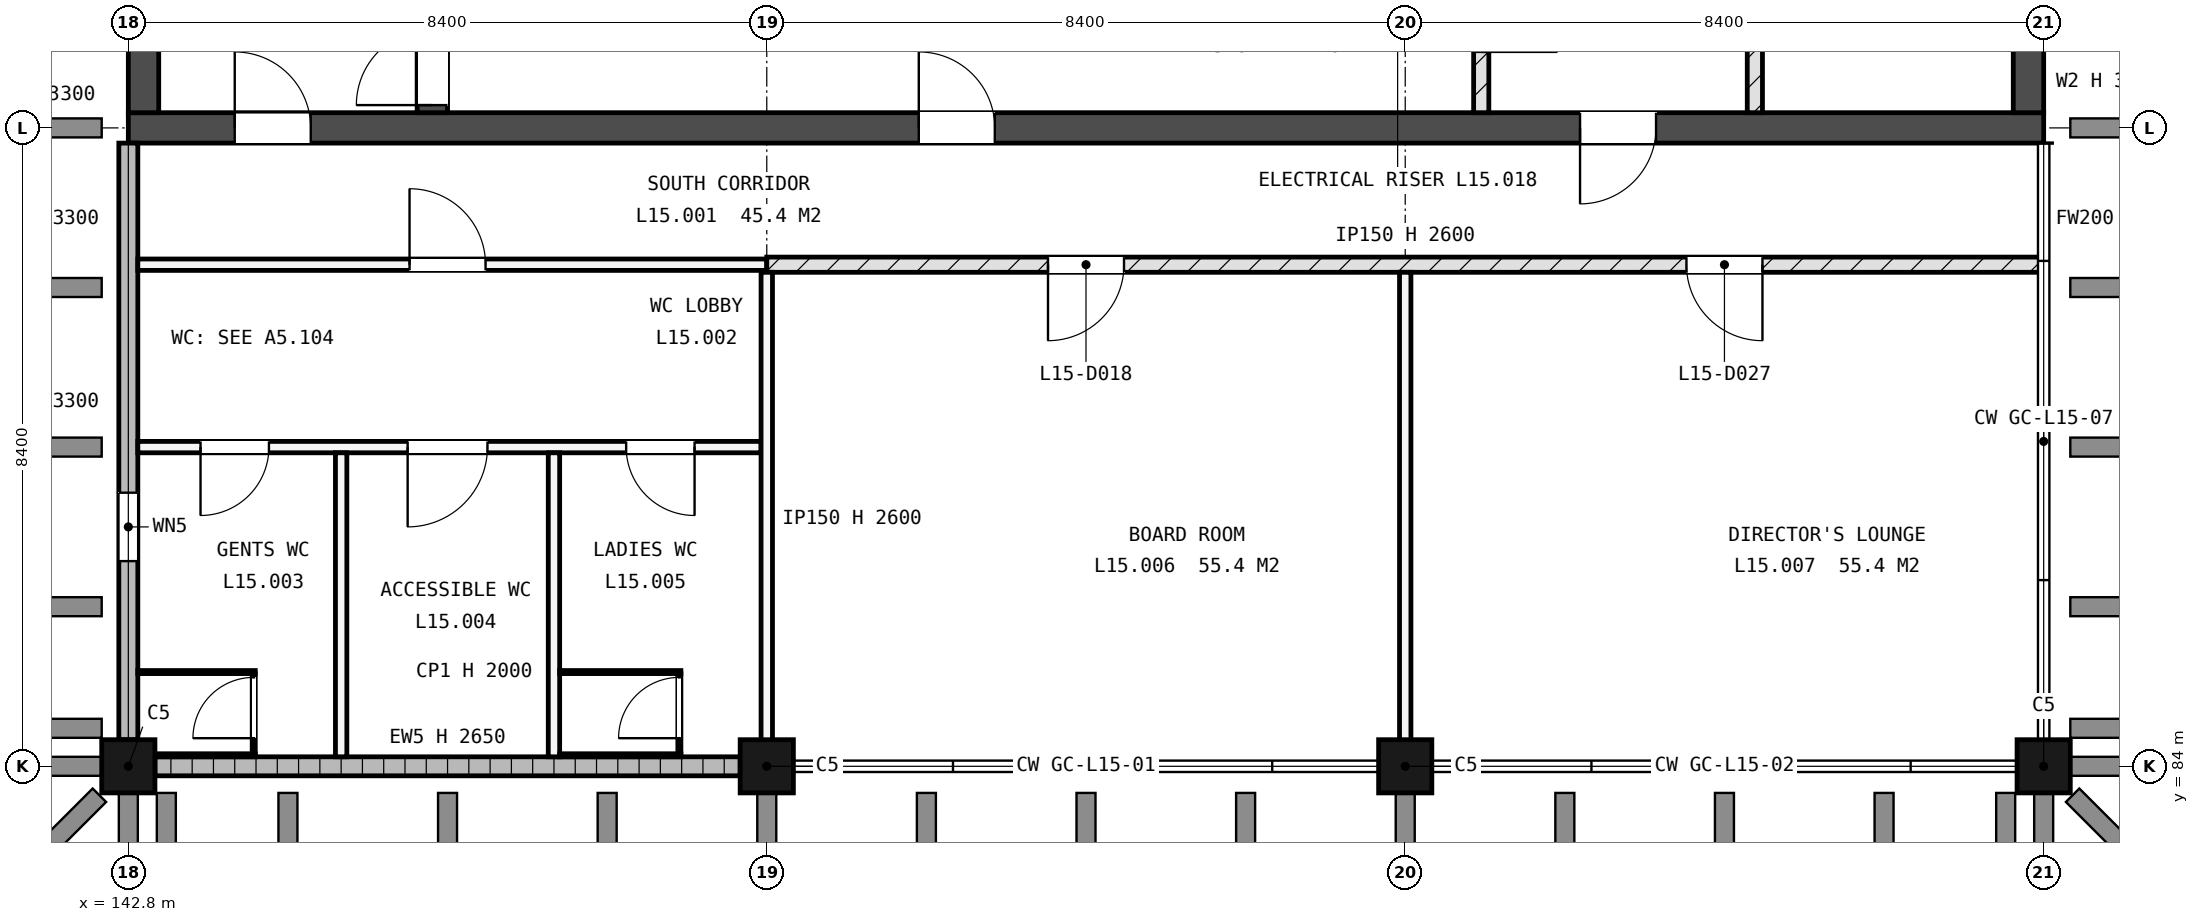
"""IFC4 building model, lengths in metres.
Left out: names, types, materials, properties, quantities, classifications, styles, units other than length and angle.
Written with IfcOpenShell. Run it as: python <this file> out.ifc"""

import sys

from ifc_helpers import new_model, si_unit, direction, frame, frame_2d, origin, origin_2d, place, context, subcontext, project, spatial, rectangle, extrude, element, fill, save


model = new_model("IFC4")
c1 = context("Model", 3, precision=1e-05, world=origin(), true_north=direction((0.0, 1.0)))
c2 = subcontext(c1, "Body", "Model", "MODEL_VIEW")
j1 = project(units=[si_unit("LENGTHUNIT", "METRE"), si_unit("PLANEANGLEUNIT", "RADIAN")], contexts=[c1])
p1 = place(None, origin())
s1 = spatial("IfcSite", under=j1, at=p1, CompositionType="ELEMENT")
p2 = place(p1, origin())
s2 = spatial("IfcBuilding", under=s1, at=p2, CompositionType="ELEMENT")
p3 = place(p2, frame((0.0, 0.0, 57.6)))
s3 = spatial("IfcBuildingStorey", under=s2, at=p3, CompositionType="ELEMENT", Elevation=57.6)
for number, where, z_axis, x_axis in (
    (1, (142.8, 84.0, -0.3), (0.0, 0.0, 1.0), (1.0, 0.0, 0.0)),
    (2, (151.2, 84.0, -0.3), (0.0, 0.0, 1.0), (1.0, 0.0, 0.0)),
    (3, (159.6, 84.0, -0.3), (0.0, 0.0, 1.0), (1.0, 0.0, 0.0)),
    (4, (168.0, 84.0, -0.3), (0.0, 0.0, 1.0), (1.0, 0.0, 0.0)),
):
    element("IfcColumn", number, at=place(p3, frame(where, z_axis=z_axis, x_axis=x_axis)), inside=s3, PredefinedType="COLUMN", context=c2, shape_type="SweptSolid", body=[
        extrude(rectangle(XDim=0.7, YDim=0.7, at=origin_2d()), origin(), (0.0, 0.0, 1.0), 3.6),
    ])
p4 = place(p3, frame((142.8, 92.4, -0.3), z_axis=(0.0, 0.0, 1.0), x_axis=(1.0, 0.0, 0.0)))
e5 = element("IfcWall", 5, at=p4, inside=s3, PredefinedType="SHEAR", context=c2, shape_type="SweptSolid", body=[
    extrude(rectangle(XDim=25.2, YDim=0.4, at=frame_2d((12.6, 0.0))), origin(), (0.0, 0.0, 1.0), 3.6),
])
p5 = place(p4, frame((1.4, 0.0, 0.3)))
e6 = element("IfcOpeningElement", 6, at=p5, cuts=e5, PredefinedType="OPENING", context=c2, shape_type="SweptSolid", body=[
    extrude(rectangle(XDim=1.0, YDim=2.1, at=frame_2d((0.5, 1.05))), frame((0.0, 0.21, 0.0), z_axis=(0.0, -1.0, 0.0), x_axis=(1.0, 0.0, 0.0)), (0.0, 0.0, 1.0), 0.42),
])
p6 = place(p4, frame((19.1, 0.0, 0.3)))
e7 = element("IfcOpeningElement", 7, at=p6, cuts=e5, PredefinedType="OPENING", context=c2, shape_type="SweptSolid", body=[
    extrude(rectangle(XDim=1.0, YDim=2.1, at=frame_2d((0.5, 1.05))), frame((0.0, 0.21, 0.0), z_axis=(0.0, -1.0, 0.0), x_axis=(1.0, 0.0, 0.0)), (0.0, 0.0, 1.0), 0.42),
])
p7 = place(p4, frame((10.4, 0.0, 0.3)))
e8 = element("IfcOpeningElement", 8, at=p7, cuts=e5, PredefinedType="OPENING", context=c2, shape_type="SweptSolid", body=[
    extrude(rectangle(XDim=1.0, YDim=2.1, at=frame_2d((0.5, 1.05))), frame((0.0, 0.21, 0.0), z_axis=(0.0, -1.0, 0.0), x_axis=(1.0, 0.0, 0.0)), (0.0, 0.0, 1.0), 0.42),
])
p8 = place(p3, frame((143.0, 92.6, -0.3), z_axis=(0.0, 0.0, 1.0), x_axis=(0.0, 1.0, 0.0)))
e9 = element("IfcWall", 9, at=p8, inside=s3, PredefinedType="SHEAR", context=c2, shape_type="SweptSolid", body=[
    extrude(rectangle(XDim=16.4, YDim=0.4, at=frame_2d((8.2, 0.0))), origin(), (0.0, 0.0, 1.0), 3.6),
])
p9 = place(p8, frame((3.0, 0.0, 1.9)))
e10 = element("IfcOpeningElement", 10, at=p9, cuts=e9, PredefinedType="OPENING", context=c2, shape_type="SweptSolid", body=[
    extrude(rectangle(XDim=1.2, YDim=0.9, at=frame_2d((0.6, 0.45))), frame((0.0, 0.21, 0.0), z_axis=(0.0, -1.0, 0.0), x_axis=(1.0, 0.0, 0.0)), (0.0, 0.0, 1.0), 0.42),
])
p10 = place(p3, frame((167.8, 92.6, -0.3), z_axis=(0.0, 0.0, 1.0), x_axis=(0.0, 1.0, 0.0)))
e11 = element("IfcWall", 11, at=p10, inside=s3, PredefinedType="SHEAR", context=c2, shape_type="SweptSolid", body=[
    extrude(rectangle(XDim=16.4, YDim=0.4, at=frame_2d((8.2, 0.0))), origin(), (0.0, 0.0, 1.0), 3.6),
])
p11 = place(p10, frame((12.2, 0.0, 1.9)))
e12 = element("IfcOpeningElement", 12, at=p11, cuts=e11, PredefinedType="OPENING", context=c2, shape_type="SweptSolid", body=[
    extrude(rectangle(XDim=1.2, YDim=0.9, at=frame_2d((0.6, 0.45))), frame((0.0, 0.21, 0.0), z_axis=(0.0, -1.0, 0.0), x_axis=(1.0, 0.0, 0.0)), (0.0, 0.0, 1.0), 0.42),
])
p12 = place(p3, frame((146.8, 92.6, -0.3), z_axis=(0.0, 0.0, 1.0), x_axis=(0.0, 1.0, 0.0)))
e13 = element("IfcWall", 13, at=p12, inside=s3, PredefinedType="SHEAR", context=c2, shape_type="SweptSolid", body=[
    extrude(rectangle(XDim=7.525, YDim=0.4, at=frame_2d((3.762, 0.0))), origin(), (0.0, 0.0, 1.0), 3.6),
])
p13 = place(p12, frame((0.1, 0.0, 0.3)))
e14 = element("IfcOpeningElement", 14, at=p13, cuts=e13, PredefinedType="OPENING", context=c2, shape_type="SweptSolid", body=[
    extrude(rectangle(XDim=1.0, YDim=2.1, at=frame_2d((0.5, 1.05))), frame((0.0, 0.21, 0.0), z_axis=(0.0, -1.0, 0.0), x_axis=(1.0, 0.0, 0.0)), (0.0, 0.0, 1.0), 0.42),
])
p14 = place(p3, frame((143.15, 84.0, 0.0), z_axis=(0.0, 0.0, 1.0), x_axis=(1.0, 0.0, 0.0)))
e15 = element("IfcWall", 15, at=p14, inside=s3, PredefinedType="STANDARD", context=c2, shape_type="SweptSolid", body=[
    extrude(rectangle(XDim=7.7, YDim=0.25, at=frame_2d((3.85, 0.0))), origin(), (0.0, 0.0, 1.0), 2.65),
])
p15 = place(p3, frame((142.8, 84.35, 0.0), z_axis=(0.0, 0.0, 1.0), x_axis=(0.0, 1.0, 0.0)))
e16 = element("IfcWall", 16, at=p15, inside=s3, PredefinedType="STANDARD", context=c2, shape_type="SweptSolid", body=[
    extrude(rectangle(XDim=7.85, YDim=0.25, at=frame_2d((3.925, 0.0))), origin(), (0.0, 0.0, 1.0), 3.3),
])
p16 = place(p15, frame((2.35, 0.0, 2.1)))
e17 = element("IfcOpeningElement", 17, at=p16, cuts=e16, PredefinedType="OPENING", context=c2, shape_type="SweptSolid", body=[
    extrude(rectangle(XDim=0.9, YDim=0.6, at=frame_2d((0.45, 0.3))), frame((0.0, 0.135, 0.0), z_axis=(0.0, -1.0, 0.0), x_axis=(1.0, 0.0, 0.0)), (0.0, 0.0, 1.0), 0.27),
])
p17 = place(p3, frame((142.925, 88.2, 0.0), z_axis=(0.0, 0.0, 1.0), x_axis=(1.0, 0.0, 0.0)))
e18 = element("IfcWall", 18, at=p17, inside=s3, PredefinedType="PARTITIONING", context=c2, shape_type="SweptSolid", body=[
    extrude(rectangle(XDim=8.2, YDim=0.15, at=frame_2d((4.1, 0.0))), origin(), (0.0, 0.0, 1.0), 3.3),
])
p18 = place(p17, frame((0.825, 0.0, 0.0)))
e19 = element("IfcOpeningElement", 19, at=p18, cuts=e18, PredefinedType="OPENING", context=c2, shape_type="SweptSolid", body=[
    extrude(rectangle(XDim=0.9, YDim=2.1, at=frame_2d((0.45, 1.05))), frame((0.0, 0.085, 0.0), z_axis=(0.0, -1.0, 0.0), x_axis=(1.0, 0.0, 0.0)), (0.0, 0.0, 1.0), 0.17),
])
p19 = place(p17, frame((3.55, 0.0, 0.0)))
e20 = element("IfcOpeningElement", 20, at=p19, cuts=e18, PredefinedType="OPENING", context=c2, shape_type="SweptSolid", body=[
    extrude(rectangle(XDim=1.05, YDim=2.25, at=frame_2d((0.525, 1.125))), frame((0.0, 0.085, 0.0), z_axis=(0.0, -1.0, 0.0), x_axis=(1.0, 0.0, 0.0)), (0.0, 0.0, 1.0), 0.17),
])
p20 = place(p17, frame((6.425, 0.0, 0.0)))
e21 = element("IfcOpeningElement", 21, at=p20, cuts=e18, PredefinedType="OPENING", context=c2, shape_type="SweptSolid", body=[
    extrude(rectangle(XDim=0.9, YDim=2.1, at=frame_2d((0.45, 1.05))), frame((0.0, 0.085, 0.0), z_axis=(0.0, -1.0, 0.0), x_axis=(1.0, 0.0, 0.0)), (0.0, 0.0, 1.0), 0.17),
])
p21 = place(p3, frame((142.925, 90.6, 0.0), z_axis=(0.0, 0.0, 1.0), x_axis=(1.0, 0.0, 0.0)))
e22 = element("IfcWall", 22, at=p21, inside=s3, PredefinedType="PARTITIONING", context=c2, shape_type="SweptSolid", body=[
    extrude(rectangle(XDim=8.275, YDim=0.15, at=frame_2d((4.137, 0.0))), origin(), (0.0, 0.0, 1.0), 3.3),
])
p22 = place(p21, frame((3.575, 0.0, 0.0)))
e23 = element("IfcOpeningElement", 23, at=p22, cuts=e22, PredefinedType="OPENING", context=c2, shape_type="SweptSolid", body=[
    extrude(rectangle(XDim=1.0, YDim=2.1, at=frame_2d((0.5, 1.05))), frame((0.0, 0.085, 0.0), z_axis=(0.0, -1.0, 0.0), x_axis=(1.0, 0.0, 0.0)), (0.0, 0.0, 1.0), 0.17),
])
p23 = place(p3, frame((151.2, 90.6, 0.0), z_axis=(0.0, 0.0, 1.0), x_axis=(1.0, 0.0, 0.0)))
e24 = element("IfcWall", 24, at=p23, inside=s3, PredefinedType="SOLIDWALL", context=c2, shape_type="SweptSolid", body=[
    extrude(rectangle(XDim=16.8, YDim=0.2, at=frame_2d((8.4, 0.0))), origin(), (0.0, 0.0, 1.0), 3.3),
])
p24 = place(p23, frame((3.7, 0.0, 0.0)))
e25 = element("IfcOpeningElement", 25, at=p24, cuts=e24, PredefinedType="OPENING", context=c2, shape_type="SweptSolid", body=[
    extrude(rectangle(XDim=1.0, YDim=2.1, at=frame_2d((0.5, 1.05))), frame((0.0, 0.11, 0.0), z_axis=(0.0, -1.0, 0.0), x_axis=(1.0, 0.0, 0.0)), (0.0, 0.0, 1.0), 0.22),
])
p25 = place(p23, frame((12.1, 0.0, 0.0)))
e26 = element("IfcOpeningElement", 26, at=p25, cuts=e24, PredefinedType="OPENING", context=c2, shape_type="SweptSolid", body=[
    extrude(rectangle(XDim=1.0, YDim=2.1, at=frame_2d((0.5, 1.05))), frame((0.0, 0.11, 0.0), z_axis=(0.0, -1.0, 0.0), x_axis=(1.0, 0.0, 0.0)), (0.0, 0.0, 1.0), 0.22),
])
for number, where, z_axis, x_axis in (
    (27, (145.6, 84.125, 0.0), (0.0, 0.0, 1.0), (0.0, 1.0, 0.0)),
    (28, (148.4, 84.125, 0.0), (0.0, 0.0, 1.0), (0.0, 1.0, 0.0)),
):
    element("IfcWall", number, at=place(p3, frame(where, z_axis=z_axis, x_axis=x_axis)), inside=s3, PredefinedType="PARTITIONING", context=c2, shape_type="SweptSolid", body=[
        extrude(rectangle(XDim=4.0, YDim=0.15, at=frame_2d((2.0, 0.0))), origin(), (0.0, 0.0, 1.0), 3.3),
    ])
for number, where, z_axis, x_axis in (
    (29, (151.2, 84.0, 0.0), (0.0, 0.0, 1.0), (0.0, 1.0, 0.0)),
    (30, (159.6, 84.0, 0.0), (0.0, 0.0, 1.0), (0.0, 1.0, 0.0)),
):
    element("IfcWall", number, at=place(p3, frame(where, z_axis=z_axis, x_axis=x_axis)), inside=s3, PredefinedType="PARTITIONING", context=c2, shape_type="SweptSolid", body=[
        extrude(rectangle(XDim=6.5, YDim=0.15, at=frame_2d((3.25, 0.0))), origin(), (0.0, 0.0, 1.0), 2.6),
    ])
p26 = place(p3, frame((160.6, 92.6, 0.0), z_axis=(0.0, 0.0, 1.0), x_axis=(0.0, 1.0, 0.0)))
e31 = element("IfcWall", 31, at=p26, inside=s3, PredefinedType="SOLIDWALL", context=c2, shape_type="SweptSolid", body=[
    extrude(rectangle(XDim=12.5, YDim=0.2, at=frame_2d((6.25, 0.0))), origin(), (0.0, 0.0, 1.0), 3.3),
])
p27 = place(p26, frame((5.1, 0.0, 0.0)))
e32 = element("IfcOpeningElement", 32, at=p27, cuts=e31, PredefinedType="OPENING", context=c2, shape_type="SweptSolid", body=[
    extrude(rectangle(XDim=0.8, YDim=2.1, at=frame_2d((0.4, 1.05))), frame((0.0, 0.11, 0.0), z_axis=(0.0, -1.0, 0.0), x_axis=(1.0, 0.0, 0.0)), (0.0, 0.0, 1.0), 0.22),
])
p28 = place(p26, frame((0.8, 0.0, 0.0)))
e33 = element("IfcOpeningElement", 33, at=p28, cuts=e31, PredefinedType="OPENING", context=c2, shape_type="SweptSolid", body=[
    extrude(rectangle(XDim=1.0, YDim=2.1, at=frame_2d((0.5, 1.05))), frame((0.0, 0.11, 0.0), z_axis=(0.0, -1.0, 0.0), x_axis=(1.0, 0.0, 0.0)), (0.0, 0.0, 1.0), 0.22),
])
p29 = place(p3, frame((164.2, 92.6, 0.0), z_axis=(0.0, 0.0, 1.0), x_axis=(0.0, 1.0, 0.0)))
e34 = element("IfcWall", 34, at=p29, inside=s3, PredefinedType="SOLIDWALL", context=c2, shape_type="SweptSolid", body=[
    extrude(rectangle(XDim=8.75, YDim=0.2, at=frame_2d((4.375, 0.0))), origin(), (0.0, 0.0, 1.0), 3.3),
])
p30 = place(p29, frame((1.7, 0.0, 0.0)))
e35 = element("IfcOpeningElement", 35, at=p30, cuts=e34, PredefinedType="OPENING", context=c2, shape_type="SweptSolid", body=[
    extrude(rectangle(XDim=0.8, YDim=2.1, at=frame_2d((0.4, 1.05))), frame((0.0, 0.11, 0.0), z_axis=(0.0, -1.0, 0.0), x_axis=(1.0, 0.0, 0.0)), (0.0, 0.0, 1.0), 0.22),
])
p31 = place(p29, frame((6.3, 0.0, 0.0)))
e36 = element("IfcOpeningElement", 36, at=p31, cuts=e34, PredefinedType="OPENING", context=c2, shape_type="SweptSolid", body=[
    extrude(rectangle(XDim=0.8, YDim=2.1, at=frame_2d((0.4, 1.05))), frame((0.0, 0.11, 0.0), z_axis=(0.0, -1.0, 0.0), x_axis=(1.0, 0.0, 0.0)), (0.0, 0.0, 1.0), 0.22),
])
p32 = place(p3, frame((142.93, 84.145, 0.0), z_axis=(0.0, 0.0, 1.0), x_axis=(1.0, 0.0, 0.0)))
e37 = element("IfcWall", 37, at=p32, inside=s3, PredefinedType="PARTITIONING", context=c2, shape_type="SweptSolid", body=[
    extrude(rectangle(XDim=1.54, YDim=0.04, at=frame_2d((0.77, 0.0))), origin(), (0.0, 0.0, 1.0), 2.0),
])
p33 = place(p3, frame((142.925, 85.24, 0.0), z_axis=(0.0, 0.0, 1.0), x_axis=(1.0, 0.0, 0.0)))
e38 = element("IfcWall", 38, at=p33, inside=s3, PredefinedType="PARTITIONING", context=c2, shape_type="SweptSolid", body=[
    extrude(rectangle(XDim=1.545, YDim=0.04, at=frame_2d((0.772, 0.0))), origin(), (0.0, 0.0, 1.0), 2.0),
])
p34 = place(p3, frame((144.45, 84.165, 0.0), z_axis=(0.0, 0.0, 1.0), x_axis=(0.0, 1.0, 0.0)))
e39 = element("IfcWall", 39, at=p34, inside=s3, PredefinedType="PARTITIONING", context=c2, shape_type="SweptSolid", body=[
    extrude(rectangle(XDim=1.055, YDim=0.04, at=frame_2d((0.527, 0.0))), origin(), (0.0, 0.0, 1.0), 2.0),
])
p35 = place(p34, frame((0.205, 0.0, 0.0)))
e40 = element("IfcOpeningElement", 40, at=p35, cuts=e39, PredefinedType="OPENING", context=c2, shape_type="SweptSolid", body=[
    extrude(rectangle(XDim=0.8, YDim=2.0, at=frame_2d((0.4, 1.0))), frame((0.0, 0.03, 0.0), z_axis=(0.0, -1.0, 0.0), x_axis=(1.0, 0.0, 0.0)), (0.0, 0.0, 1.0), 0.06),
])
for number, where, z_axis, x_axis in (
    (41, (148.475, 84.145, 0.0), (0.0, 0.0, 1.0), (1.0, 0.0, 0.0)),
    (42, (148.475, 85.24, 0.0), (0.0, 0.0, 1.0), (1.0, 0.0, 0.0)),
):
    element("IfcWall", number, at=place(p3, frame(where, z_axis=z_axis, x_axis=x_axis)), inside=s3, PredefinedType="PARTITIONING", context=c2, shape_type="SweptSolid", body=[
        extrude(rectangle(XDim=1.595, YDim=0.04, at=frame_2d((0.797, 0.0))), origin(), (0.0, 0.0, 1.0), 2.0),
    ])
p36 = place(p3, frame((150.05, 84.165, 0.0), z_axis=(0.0, 0.0, 1.0), x_axis=(0.0, 1.0, 0.0)))
e43 = element("IfcWall", 43, at=p36, inside=s3, PredefinedType="PARTITIONING", context=c2, shape_type="SweptSolid", body=[
    extrude(rectangle(XDim=1.055, YDim=0.04, at=frame_2d((0.527, 0.0))), origin(), (0.0, 0.0, 1.0), 2.0),
])
p37 = place(p36, frame((0.205, 0.0, 0.0)))
e44 = element("IfcOpeningElement", 44, at=p37, cuts=e43, PredefinedType="OPENING", context=c2, shape_type="SweptSolid", body=[
    extrude(rectangle(XDim=0.8, YDim=2.0, at=frame_2d((0.4, 1.0))), frame((0.0, 0.03, 0.0), z_axis=(0.0, -1.0, 0.0), x_axis=(1.0, 0.0, 0.0)), (0.0, 0.0, 1.0), 0.06),
])
p38 = place(p16, origin())
e45 = element("IfcWindow", 45, at=p38, inside=s3, PartitioningType="SINGLE_PANEL", PredefinedType="WINDOW", context=c2, shape_type="SweptSolid", body=[
    extrude(rectangle(XDim=0.9, YDim=0.6, at=frame_2d((0.45, 0.3))), frame((0.0, 0.03, 0.0), z_axis=(0.0, -1.0, 0.0), x_axis=(1.0, 0.0, 0.0)), (0.0, 0.0, 1.0), 0.06),
])
fill(e17, e45)
p39 = place(p5, origin())
e46 = element("IfcDoor", 46, at=p39, inside=s3, OperationType="SINGLE_SWING_RIGHT", PredefinedType="DOOR", context=c2, shape_type="SweptSolid", body=[
    extrude(rectangle(XDim=1.0, YDim=2.1, at=frame_2d((0.5, 1.05))), frame((0.0, 0.025, 0.0), z_axis=(0.0, -1.0, 0.0), x_axis=(1.0, 0.0, 0.0)), (0.0, 0.0, 1.0), 0.05),
])
fill(e6, e46)
p40 = place(p13, origin())
e47 = element("IfcDoor", 47, at=p40, inside=s3, OperationType="SINGLE_SWING_RIGHT", PredefinedType="DOOR", context=c2, shape_type="SweptSolid", body=[
    extrude(rectangle(XDim=1.0, YDim=2.1, at=frame_2d((0.5, 1.05))), frame((0.0, 0.025, 0.0), z_axis=(0.0, -1.0, 0.0), x_axis=(1.0, 0.0, 0.0)), (0.0, 0.0, 1.0), 0.05),
])
fill(e14, e47)
p41 = place(p18, origin())
e48 = element("IfcDoor", 48, at=p41, inside=s3, OperationType="SINGLE_SWING_LEFT", PredefinedType="DOOR", context=c2, shape_type="SweptSolid", body=[
    extrude(rectangle(XDim=0.9, YDim=2.1, at=frame_2d((0.45, 1.05))), frame((0.0, 0.025, 0.0), z_axis=(0.0, -1.0, 0.0), x_axis=(1.0, 0.0, 0.0)), (0.0, 0.0, 1.0), 0.05),
])
fill(e19, e48)
p42 = place(p19, origin())
e49 = element("IfcDoor", 49, at=p42, inside=s3, OperationType="SINGLE_SWING_LEFT", PredefinedType="DOOR", context=c2, shape_type="SweptSolid", body=[
    extrude(rectangle(XDim=1.05, YDim=2.25, at=frame_2d((0.525, 1.125))), frame((0.0, 0.025, 0.0), z_axis=(0.0, -1.0, 0.0), x_axis=(1.0, 0.0, 0.0)), (0.0, 0.0, 1.0), 0.05),
])
fill(e20, e49)
p43 = place(p20, origin())
e50 = element("IfcDoor", 50, at=p43, inside=s3, OperationType="SINGLE_SWING_RIGHT", PredefinedType="DOOR", context=c2, shape_type="SweptSolid", body=[
    extrude(rectangle(XDim=0.9, YDim=2.1, at=frame_2d((0.45, 1.05))), frame((0.0, 0.025, 0.0), z_axis=(0.0, -1.0, 0.0), x_axis=(1.0, 0.0, 0.0)), (0.0, 0.0, 1.0), 0.05),
])
fill(e21, e50)
p44 = place(p24, origin())
e51 = element("IfcDoor", 51, at=p44, inside=s3, OperationType="SINGLE_SWING_LEFT", PredefinedType="DOOR", context=c2, shape_type="SweptSolid", body=[
    extrude(rectangle(XDim=1.0, YDim=2.1, at=frame_2d((0.5, 1.05))), frame((0.0, 0.025, 0.0), z_axis=(0.0, -1.0, 0.0), x_axis=(1.0, 0.0, 0.0)), (0.0, 0.0, 1.0), 0.05),
])
fill(e25, e51)
p45 = place(p25, origin())
e52 = element("IfcDoor", 52, at=p45, inside=s3, OperationType="SINGLE_SWING_RIGHT", PredefinedType="DOOR", context=c2, shape_type="SweptSolid", body=[
    extrude(rectangle(XDim=1.0, YDim=2.1, at=frame_2d((0.5, 1.05))), frame((0.0, 0.025, 0.0), z_axis=(0.0, -1.0, 0.0), x_axis=(1.0, 0.0, 0.0)), (0.0, 0.0, 1.0), 0.05),
])
fill(e26, e52)
p46 = place(p22, origin())
e53 = element("IfcDoor", 53, at=p46, inside=s3, OperationType="SINGLE_SWING_RIGHT", PredefinedType="DOOR", context=c2, shape_type="SweptSolid", body=[
    extrude(rectangle(XDim=1.0, YDim=2.1, at=frame_2d((0.5, 1.05))), frame((0.0, 0.025, 0.0), z_axis=(0.0, -1.0, 0.0), x_axis=(1.0, 0.0, 0.0)), (0.0, 0.0, 1.0), 0.05),
])
fill(e23, e53)
p47 = place(p6, origin())
e54 = element("IfcDoor", 54, at=p47, inside=s3, OperationType="SINGLE_SWING_LEFT", PredefinedType="DOOR", context=c2, shape_type="SweptSolid", body=[
    extrude(rectangle(XDim=1.0, YDim=2.1, at=frame_2d((0.5, 1.05))), frame((0.0, 0.025, 0.0), z_axis=(0.0, -1.0, 0.0), x_axis=(1.0, 0.0, 0.0)), (0.0, 0.0, 1.0), 0.05),
])
fill(e7, e54)
p48 = place(p7, origin())
e55 = element("IfcDoor", 55, at=p48, inside=s3, OperationType="SINGLE_SWING_RIGHT", PredefinedType="DOOR", context=c2, shape_type="SweptSolid", body=[
    extrude(rectangle(XDim=1.0, YDim=2.1, at=frame_2d((0.5, 1.05))), frame((0.0, 0.025, 0.0), z_axis=(0.0, -1.0, 0.0), x_axis=(1.0, 0.0, 0.0)), (0.0, 0.0, 1.0), 0.05),
])
fill(e8, e55)
p49 = place(p35, origin())
e56 = element("IfcDoor", 56, at=p49, inside=s3, OperationType="SINGLE_SWING_LEFT", PredefinedType="DOOR", context=c2, shape_type="SweptSolid", body=[
    extrude(rectangle(XDim=0.8, YDim=2.0, at=frame_2d((0.4, 1.0))), frame((0.0, 0.02, 0.0), z_axis=(0.0, -1.0, 0.0), x_axis=(1.0, 0.0, 0.0)), (0.0, 0.0, 1.0), 0.04),
])
fill(e40, e56)
p50 = place(p37, origin())
e57 = element("IfcDoor", 57, at=p50, inside=s3, OperationType="SINGLE_SWING_LEFT", PredefinedType="DOOR", context=c2, shape_type="SweptSolid", body=[
    extrude(rectangle(XDim=0.8, YDim=2.0, at=frame_2d((0.4, 1.0))), frame((0.0, 0.02, 0.0), z_axis=(0.0, -1.0, 0.0), x_axis=(1.0, 0.0, 0.0)), (0.0, 0.0, 1.0), 0.04),
])
fill(e44, e57)
save(model, sys.argv[1])
